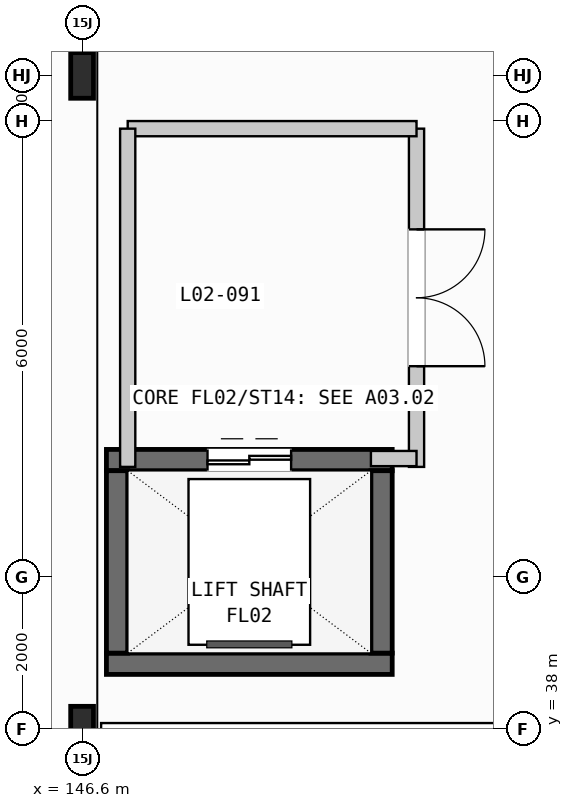
"""IFC4 building model, lengths in metres.
Left out: names, types, materials, properties, quantities, classifications, styles, units other than length and angle.
Written with IfcOpenShell. Run it as: python <this file> out.ifc"""

import sys

from ifc_helpers import new_model, si_unit, direction, frame, frame_2d, origin, origin_2d, place, context, subcontext, project, spatial, rectangle, i_section, extrude, element, fill, save


model = new_model("IFC4")
c1 = context("Model", 3, precision=1e-05, world=origin(), true_north=direction((0.0, 1.0)))
c2 = subcontext(c1, "Body", "Model", "MODEL_VIEW")
j1 = project(units=[si_unit("LENGTHUNIT", "METRE"), si_unit("PLANEANGLEUNIT", "RADIAN")], contexts=[c1])
p1 = place(None, origin())
s1 = spatial("IfcSite", under=j1, at=p1, CompositionType="ELEMENT")
p2 = place(p1, origin())
s2 = spatial("IfcBuilding", under=s1, at=p2, CompositionType="ELEMENT")
p3 = place(p2, frame((0.0, 0.0, 11.4)))
s3 = spatial("IfcBuildingStorey", under=s2, at=p3, CompositionType="ELEMENT", Elevation=11.4)
for number, where, z_axis, x_axis in (
    (1, (146.6, 38.0, 0.0), (0.0, 0.0, 1.0), (1.0, 0.0, 0.0)),
    (2, (146.6, 46.6, 0.0), (0.0, 0.0, 1.0), (1.0, 0.0, 0.0)),
):
    element("IfcColumn", number, at=place(p3, frame(where, z_axis=z_axis, x_axis=x_axis)), inside=s3, PredefinedType="COLUMN", context=c2, shape_type="SweptSolid", body=[
        extrude(i_section(OverallWidth=0.3, OverallDepth=0.6, WebThickness=0.015, FlangeThickness=0.03, FilletRadius=0.027, at=origin_2d()), origin(), (0.0, 0.0, 1.0), 5.4),
    ])
p4 = place(p3, frame((146.92, 38.86, 0.0), z_axis=(0.0, 0.0, 1.0), x_axis=(1.0, 0.0, 0.0)))
e3 = element("IfcWall", 3, at=p4, inside=s3, PredefinedType="SHEAR", context=c2, shape_type="SweptSolid", body=[
    extrude(rectangle(XDim=3.76, YDim=0.28, at=frame_2d((1.88, 0.0))), origin(), (0.0, 0.0, 1.0), 5.4),
])
p5 = place(p3, frame((146.92, 41.54, 0.0), z_axis=(0.0, 0.0, 1.0), x_axis=(1.0, 0.0, 0.0)))
e4 = element("IfcWall", 4, at=p5, inside=s3, PredefinedType="SHEAR", context=c2, shape_type="SweptSolid", body=[
    extrude(rectangle(XDim=3.76, YDim=0.28, at=frame_2d((1.88, 0.0))), origin(), (0.0, 0.0, 1.0), 5.4),
])
p6 = place(p5, frame((1.33, 0.0, 0.0)))
e5 = element("IfcOpeningElement", 5, at=p6, cuts=e4, PredefinedType="OPENING", context=c2, shape_type="SweptSolid", body=[
    extrude(rectangle(XDim=1.1, YDim=2.15, at=frame_2d((0.55, 1.075))), frame((0.0, 0.15, 0.0), z_axis=(0.0, -1.0, 0.0), x_axis=(1.0, 0.0, 0.0)), (0.0, 0.0, 1.0), 0.3),
])
for number, where, z_axis, x_axis in (
    (6, (147.06, 39.0, 0.0), (0.0, 0.0, 1.0), (0.0, 1.0, 0.0)),
    (7, (150.54, 39.0, 0.0), (0.0, 0.0, 1.0), (0.0, 1.0, 0.0)),
):
    element("IfcWall", number, at=place(p3, frame(where, z_axis=z_axis, x_axis=x_axis)), inside=s3, PredefinedType="SHEAR", context=c2, shape_type="SweptSolid", body=[
        extrude(rectangle(XDim=2.4, YDim=0.28, at=frame_2d((1.2, 0.0))), origin(), (0.0, 0.0, 1.0), 5.4),
    ])
p7 = place(p3, frame((151.0, 41.45, 0.0), z_axis=(0.0, 0.0, 1.0), x_axis=(0.0, 1.0, 0.0)))
e8 = element("IfcWall", 8, at=p7, inside=s3, PredefinedType="PARTITIONING", context=c2, shape_type="SweptSolid", body=[
    extrude(rectangle(XDim=4.45, YDim=0.2, at=frame_2d((2.225, 0.0))), origin(), (0.0, 0.0, 1.0), 4.0),
])
p8 = place(p7, frame((1.325, 0.0, 0.0)))
e9 = element("IfcOpeningElement", 9, at=p8, cuts=e8, PredefinedType="OPENING", context=c2, shape_type="SweptSolid", body=[
    extrude(rectangle(XDim=1.8, YDim=2.2, at=frame_2d((0.9, 1.1))), frame((0.0, 0.11, 0.0), z_axis=(0.0, -1.0, 0.0), x_axis=(1.0, 0.0, 0.0)), (0.0, 0.0, 1.0), 0.22),
])
p9 = place(p3, frame((147.2, 45.9, 0.0), z_axis=(0.0, 0.0, 1.0), x_axis=(1.0, 0.0, 0.0)))
e10 = element("IfcWall", 10, at=p9, inside=s3, PredefinedType="PARTITIONING", context=c2, shape_type="SweptSolid", body=[
    extrude(rectangle(XDim=3.8, YDim=0.2, at=frame_2d((1.9, 0.0))), origin(), (0.0, 0.0, 1.0), 4.0),
])
p10 = place(p3, frame((147.2, 41.45, 0.0), z_axis=(0.0, 0.0, 1.0), x_axis=(0.0, 1.0, 0.0)))
e11 = element("IfcWall", 11, at=p10, inside=s3, PredefinedType="PARTITIONING", context=c2, shape_type="SweptSolid", body=[
    extrude(rectangle(XDim=4.45, YDim=0.2, at=frame_2d((2.225, 0.0))), origin(), (0.0, 0.0, 1.0), 4.0),
])
p11 = place(p3, frame((150.4, 41.56, 0.0), z_axis=(0.0, 0.0, 1.0), x_axis=(1.0, 0.0, 0.0)))
e12 = element("IfcWall", 12, at=p11, inside=s3, PredefinedType="PARTITIONING", context=c2, shape_type="SweptSolid", body=[
    extrude(rectangle(XDim=0.6, YDim=0.2, at=frame_2d((0.3, 0.0))), origin(), (0.0, 0.0, 1.0), 4.0),
])
p12 = place(p6, origin())
e13 = element("IfcDoor", 13, at=p12, inside=s3, OperationType="DOUBLE_DOOR_SLIDING", PredefinedType="DOOR", context=c2, shape_type="SweptSolid", body=[
    extrude(rectangle(XDim=1.1, YDim=2.15, at=frame_2d((0.55, 1.075))), frame((0.0, 0.025, 0.0), z_axis=(0.0, -1.0, 0.0), x_axis=(1.0, 0.0, 0.0)), (0.0, 0.0, 1.0), 0.05),
])
fill(e5, e13)
p13 = place(p8, frame((1.8, 0.0, 0.0), z_axis=(0.0, 0.0, 1.0), x_axis=(-1.0, 0.0, 0.0)))
e14 = element("IfcDoor", 14, at=p13, inside=s3, OperationType="DOUBLE_DOOR_SINGLE_SWING", PredefinedType="DOOR", context=c2, shape_type="SweptSolid", body=[
    extrude(rectangle(XDim=1.8, YDim=2.2, at=frame_2d((0.9, 1.1))), frame((0.0, 0.025, 0.0), z_axis=(0.0, -1.0, 0.0), x_axis=(1.0, 0.0, 0.0)), (0.0, 0.0, 1.0), 0.05),
])
fill(e9, e14)
save(model, sys.argv[1])
